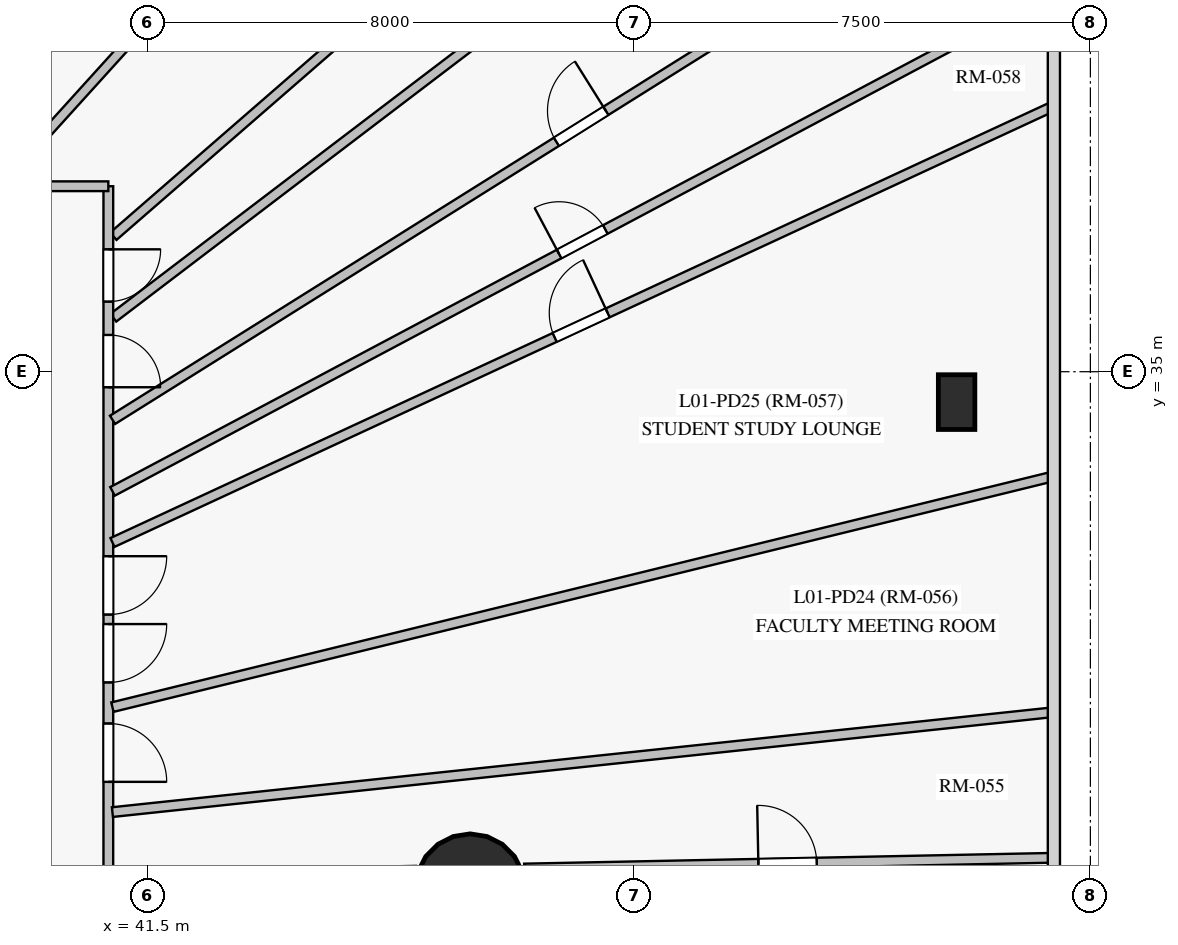
"""IFC4 building model, lengths in metres.
Left out: names, types, materials, properties, quantities, classifications, styles, units other than length and angle.
Written with IfcOpenShell. Run it as: python <this file> out.ifc"""

import sys

from ifc_helpers import new_model, si_unit, direction, frame, frame_2d, origin, origin_with_axes, origin_2d, place, context, subcontext, project, spatial, rectangle, circle, extrude, source, transform, mapped, element, fill, save


model = new_model("IFC4")
c1 = context("Model", 3, precision=1e-05, world=origin(), true_north=direction((0.0, 1.0)))
c2 = subcontext(c1, "Body", "Model", "MODEL_VIEW")
j1 = project(units=[si_unit("LENGTHUNIT", "METRE"), si_unit("PLANEANGLEUNIT", "RADIAN")], contexts=[c1])
p1 = place(None, origin())
s1 = spatial("IfcSite", under=j1, at=p1, CompositionType="ELEMENT")
p2 = place(p1, origin())
s2 = spatial("IfcBuilding", under=s1, at=p2, CompositionType="ELEMENT")
p3 = place(p2, frame((0.0, 0.0, 4.5)))
s3 = spatial("IfcBuildingStorey", under=s2, at=p3, CompositionType="ELEMENT", Elevation=4.5)
m1 = source(origin_with_axes(), c2, "Body", "SweptSolid", [
    extrude(circle(Radius=0.9, at=origin_2d()), origin(), (0.0, 0.0, 1.0), 4.5),
])
p4 = place(p3, frame((46.8, 26.5, 0.0), z_axis=(0.0, 0.0, 1.0), x_axis=(1.0, 0.0, 0.0)))
e1 = element("IfcColumn", 1, at=p4, inside=s3, PredefinedType="COLUMN", context=c2, shape_type="MappedRepresentation", body=[
    mapped(m1, transform((0.0, 0.0, 0.0), scale=1.0)),
])
m2 = source(origin_with_axes(), c2, "Body", "SweptSolid", [
    extrude(rectangle(XDim=0.6, YDim=0.9, at=origin_2d()), origin(), (0.0, 0.0, 1.0), 4.5),
])
p5 = place(p3, frame((54.8, 34.5, 0.0), z_axis=(0.0, 0.0, 1.0), x_axis=(1.0, 0.0, 0.0)))
e2 = element("IfcColumn", 2, at=p5, inside=s3, PredefinedType="PILASTER", context=c2, shape_type="MappedRepresentation", body=[
    mapped(m2, transform((0.0, 0.0, 0.0), scale=1.0)),
])
p6 = place(p3, frame((40.932, 37.227, 0.0), z_axis=(0.0, 0.0, 1.0), x_axis=(0.754711343855, 0.656057000158, 0.0)))
e3 = element("IfcWall", 3, at=p6, inside=s3, PredefinedType="PARTITIONING", context=c2, shape_type="SweptSolid", body=[
    extrude(rectangle(XDim=19.568, YDim=0.16, at=frame_2d((9.784, 0.0))), origin(), (0.0, 0.0, 1.0), 4.2),
])
p7 = place(p6, frame((9.291, 0.0, 0.0)))
e4 = element("IfcOpeningElement", 4, at=p7, cuts=e3, PredefinedType="OPENING", context=c2, shape_type="SweptSolid", body=[
    extrude(rectangle(XDim=0.96, YDim=2.15, at=frame_2d((0.48, 1.075))), frame((0.0, 0.09, 0.0), z_axis=(0.0, -1.0, 0.0), x_axis=(1.0, 0.0, 0.0)), (0.0, 0.0, 1.0), 0.18),
])
p8 = place(p3, frame((40.932, 35.888, 0.0), z_axis=(0.0, 0.0, 1.0), x_axis=(0.795705622, 0.605683550311, 0.0)))
e5 = element("IfcWall", 5, at=p8, inside=s3, PredefinedType="PARTITIONING", context=c2, shape_type="SweptSolid", body=[
    extrude(rectangle(XDim=19.392, YDim=0.16, at=frame_2d((9.696, 0.0))), origin(), (0.0, 0.0, 1.0), 4.2),
])
p9 = place(p8, frame((9.203, 0.0, 0.0)))
e6 = element("IfcOpeningElement", 6, at=p9, cuts=e5, PredefinedType="OPENING", context=c2, shape_type="SweptSolid", body=[
    extrude(rectangle(XDim=0.96, YDim=2.15, at=frame_2d((0.48, 1.075))), frame((0.0, 0.09, 0.0), z_axis=(0.0, -1.0, 0.0), x_axis=(1.0, 0.0, 0.0)), (0.0, 0.0, 1.0), 0.18),
])
p10 = place(p3, frame((40.85, 38.05, 0.0), z_axis=(0.0, 0.0, 1.0), x_axis=(0.0, -1.0, 0.0)))
e7 = element("IfcWall", 7, at=p10, inside=s3, PredefinedType="PARTITIONING", context=c2, shape_type="SweptSolid", body=[
    extrude(rectangle(XDim=18.508, YDim=0.16, at=frame_2d((9.254, 0.0))), origin(), (0.0, 0.0, 1.0), 3.25),
])
p11 = place(p10, frame((13.28, 0.0, 0.0)))
e8 = element("IfcOpeningElement", 8, at=p11, cuts=e7, PredefinedType="OPENING", context=c2, shape_type="SweptSolid", body=[
    extrude(rectangle(XDim=0.96, YDim=2.15, at=frame_2d((0.48, 1.075))), frame((0.0, 0.09, 0.0), z_axis=(0.0, -1.0, 0.0), x_axis=(1.0, 0.0, 0.0)), (0.0, 0.0, 1.0), 0.18),
])
p12 = place(p10, frame((11.636, 0.0, 0.0)))
e9 = element("IfcOpeningElement", 9, at=p12, cuts=e7, PredefinedType="OPENING", context=c2, shape_type="SweptSolid", body=[
    extrude(rectangle(XDim=0.96, YDim=2.15, at=frame_2d((0.48, 1.075))), frame((0.0, 0.09, 0.0), z_axis=(0.0, -1.0, 0.0), x_axis=(1.0, 0.0, 0.0)), (0.0, 0.0, 1.0), 0.18),
])
p13 = place(p10, frame((8.835, 0.0, 0.0)))
e10 = element("IfcOpeningElement", 10, at=p13, cuts=e7, PredefinedType="OPENING", context=c2, shape_type="SweptSolid", body=[
    extrude(rectangle(XDim=0.96, YDim=2.15, at=frame_2d((0.48, 1.075))), frame((0.0, 0.09, 0.0), z_axis=(0.0, -1.0, 0.0), x_axis=(1.0, 0.0, 0.0)), (0.0, 0.0, 1.0), 0.18),
])
p14 = place(p10, frame((6.084, 0.0, 0.0)))
e11 = element("IfcOpeningElement", 11, at=p14, cuts=e7, PredefinedType="OPENING", context=c2, shape_type="SweptSolid", body=[
    extrude(rectangle(XDim=0.96, YDim=2.15, at=frame_2d((0.48, 1.075))), frame((0.0, 0.09, 0.0), z_axis=(0.0, -1.0, 0.0), x_axis=(1.0, 0.0, 0.0)), (0.0, 0.0, 1.0), 0.18),
])
p15 = place(p10, frame((7.2, 0.0, 0.0)))
e12 = element("IfcOpeningElement", 12, at=p15, cuts=e7, PredefinedType="OPENING", context=c2, shape_type="SweptSolid", body=[
    extrude(rectangle(XDim=0.96, YDim=2.15, at=frame_2d((0.48, 1.075))), frame((0.0, 0.09, 0.0), z_axis=(0.0, -1.0, 0.0), x_axis=(1.0, 0.0, 0.0)), (0.0, 0.0, 1.0), 0.18),
])
p16 = place(p10, frame((2.446, 0.0, 0.0)))
e13 = element("IfcOpeningElement", 13, at=p16, cuts=e7, PredefinedType="OPENING", context=c2, shape_type="SweptSolid", body=[
    extrude(rectangle(XDim=0.86, YDim=2.04, at=frame_2d((0.43, 1.02))), frame((0.0, 0.09, 0.0), z_axis=(0.0, -1.0, 0.0), x_axis=(1.0, 0.0, 0.0)), (0.0, 0.0, 1.0), 0.18),
])
p17 = place(p10, frame((1.037, 0.0, 0.0)))
e14 = element("IfcOpeningElement", 14, at=p17, cuts=e7, PredefinedType="OPENING", context=c2, shape_type="SweptSolid", body=[
    extrude(rectangle(XDim=0.86, YDim=2.04, at=frame_2d((0.43, 1.02))), frame((0.0, 0.09, 0.0), z_axis=(0.0, -1.0, 0.0), x_axis=(1.0, 0.0, 0.0)), (0.0, 0.0, 1.0), 0.18),
])
p18 = place(p3, frame((40.919, 34.208, 0.0), z_axis=(0.0, 0.0, 1.0), x_axis=(0.847469594602, 0.530843937731, 0.0)))
e15 = element("IfcWall", 15, at=p18, inside=s3, PredefinedType="PARTITIONING", context=c2, shape_type="SweptSolid", body=[
    extrude(rectangle(XDim=18.226, YDim=0.16, at=frame_2d((9.113, 0.0))), origin(), (0.0, 0.0, 1.0), 4.2),
])
p19 = place(p18, frame((8.613, 0.0, 0.0)))
e16 = element("IfcOpeningElement", 16, at=p19, cuts=e15, PredefinedType="OPENING", context=c2, shape_type="SweptSolid", body=[
    extrude(rectangle(XDim=0.96, YDim=2.15, at=frame_2d((0.48, 1.075))), frame((0.0, 0.09, 0.0), z_axis=(0.0, -1.0, 0.0), x_axis=(1.0, 0.0, 0.0)), (0.0, 0.0, 1.0), 0.18),
])
p20 = place(p3, frame((40.919, 33.032, 0.0), z_axis=(0.0, 0.0, 1.0), x_axis=(0.883043074969, 0.469291942984, 0.0)))
e17 = element("IfcWall", 17, at=p20, inside=s3, PredefinedType="PARTITIONING", context=c2, shape_type="SweptSolid", body=[
    extrude(rectangle(XDim=17.495, YDim=0.16, at=frame_2d((8.748, 0.0))), origin(), (0.0, 0.0, 1.0), 4.2),
])
p21 = place(p20, frame((8.317, 0.0, 0.0)))
e18 = element("IfcOpeningElement", 18, at=p21, cuts=e17, PredefinedType="OPENING", context=c2, shape_type="SweptSolid", body=[
    extrude(rectangle(XDim=0.86, YDim=2.04, at=frame_2d((0.43, 1.02))), frame((0.0, 0.09, 0.0), z_axis=(0.0, -1.0, 0.0), x_axis=(1.0, 0.0, 0.0)), (0.0, 0.0, 1.0), 0.18),
])
p22 = place(p3, frame((40.918, 32.192, 0.0), z_axis=(0.0, 0.0, 1.0), x_axis=(0.907224152949, 0.420647520265, 0.0)))
e19 = element("IfcWall", 19, at=p22, inside=s3, PredefinedType="PARTITIONING", context=c2, shape_type="SweptSolid", body=[
    extrude(rectangle(XDim=17.031, YDim=0.16, at=frame_2d((8.515, 0.0))), origin(), (0.0, 0.0, 1.0), 4.2),
])
p23 = place(p22, frame((8.015, 0.0, 0.0)))
e20 = element("IfcOpeningElement", 20, at=p23, cuts=e19, PredefinedType="OPENING", context=c2, shape_type="SweptSolid", body=[
    extrude(rectangle(XDim=0.96, YDim=2.15, at=frame_2d((0.48, 1.075))), frame((0.0, 0.09, 0.0), z_axis=(0.0, -1.0, 0.0), x_axis=(1.0, 0.0, 0.0)), (0.0, 0.0, 1.0), 0.18),
])
p24 = place(p3, frame((40.917, 29.484, 0.0), z_axis=(0.0, 0.0, 1.0), x_axis=(0.97121044227, 0.238223166012, 0.0)))
e21 = element("IfcWall", 21, at=p24, inside=s3, PredefinedType="PARTITIONING", context=c2, shape_type="SweptSolid", body=[
    extrude(rectangle(XDim=15.914, YDim=0.16, at=frame_2d((7.957, 0.0))), origin(), (0.0, 0.0, 1.0), 3.7),
])
p25 = place(p3, frame((40.917, 27.758, 0.0), z_axis=(0.0, 0.0, 1.0), x_axis=(0.994413071603, 0.10555871838, 0.0)))
e22 = element("IfcWall", 22, at=p25, inside=s3, PredefinedType="PARTITIONING", context=c2, shape_type="SweptSolid", body=[
    extrude(rectangle(XDim=15.545, YDim=0.16, at=frame_2d((7.772, 0.0))), origin(), (0.0, 0.0, 1.0), 3.7),
])
p26 = place(p3, frame((25.4, 38.05, 0.0), z_axis=(0.0, 0.0, 1.0), x_axis=(1.0, 0.0, 0.0)))
e23 = element("IfcWall", 23, at=p26, inside=s3, PredefinedType="PARTITIONING", context=c2, shape_type="SweptSolid", body=[
    extrude(rectangle(XDim=15.45, YDim=0.16, at=frame_2d((7.725, 0.0))), origin(), (0.0, 0.0, 1.0), 4.2),
])
p27 = place(p26, frame((11.452, 0.0, 0.0)))
e24 = element("IfcOpeningElement", 24, at=p27, cuts=e23, PredefinedType="OPENING", context=c2, shape_type="SweptSolid", body=[
    extrude(rectangle(XDim=0.96, YDim=2.15, at=frame_2d((0.48, 1.075))), frame((0.0, 0.09, 0.0), z_axis=(0.0, -1.0, 0.0), x_axis=(1.0, 0.0, 0.0)), (0.0, 0.0, 1.0), 0.18),
])
p28 = place(p26, frame((7.59, 0.0, 0.0)))
e25 = element("IfcOpeningElement", 25, at=p28, cuts=e23, PredefinedType="OPENING", context=c2, shape_type="SweptSolid", body=[
    extrude(rectangle(XDim=0.96, YDim=2.15, at=frame_2d((0.48, 1.075))), frame((0.0, 0.09, 0.0), z_axis=(0.0, -1.0, 0.0), x_axis=(1.0, 0.0, 0.0)), (0.0, 0.0, 1.0), 0.18),
])
p29 = place(p26, frame((5.573, 0.0, 0.0)))
e26 = element("IfcOpeningElement", 26, at=p29, cuts=e23, PredefinedType="OPENING", context=c2, shape_type="SweptSolid", body=[
    extrude(rectangle(XDim=0.96, YDim=2.15, at=frame_2d((0.48, 1.075))), frame((0.0, 0.09, 0.0), z_axis=(0.0, -1.0, 0.0), x_axis=(1.0, 0.0, 0.0)), (0.0, 0.0, 1.0), 0.18),
])
p30 = place(p26, frame((3.528, 0.0, 0.0)))
e27 = element("IfcOpeningElement", 27, at=p30, cuts=e23, PredefinedType="OPENING", context=c2, shape_type="SweptSolid", body=[
    extrude(rectangle(XDim=0.96, YDim=2.15, at=frame_2d((0.48, 1.075))), frame((0.0, 0.09, 0.0), z_axis=(0.0, -1.0, 0.0), x_axis=(1.0, 0.0, 0.0)), (0.0, 0.0, 1.0), 0.18),
])
p31 = place(p3, frame((36.273, 38.132, 0.0), z_axis=(0.0, 0.0, 1.0), x_axis=(0.552038412562, 0.833818679963, 0.0)))
e28 = element("IfcWall", 28, at=p31, inside=s3, PredefinedType="PARTITIONING", context=c2, shape_type="SweptSolid", body=[
    extrude(rectangle(XDim=14.79, YDim=0.16, at=frame_2d((7.395, 0.0))), origin(), (0.0, 0.0, 1.0), 4.2),
])
p32 = place(p31, frame((6.903, 0.0, 0.0)))
e29 = element("IfcOpeningElement", 29, at=p32, cuts=e28, PredefinedType="OPENING", context=c2, shape_type="SweptSolid", body=[
    extrude(rectangle(XDim=0.96, YDim=2.15, at=frame_2d((0.48, 1.075))), frame((0.0, 0.09, 0.0), z_axis=(0.0, -1.0, 0.0), x_axis=(1.0, 0.0, 0.0)), (0.0, 0.0, 1.0), 0.18),
])
p33 = place(p3, frame((35.426, 38.119, 0.0), z_axis=(0.0, 0.0, 1.0), x_axis=(0.508185874547, 0.861247419103, 0.0)))
e30 = element("IfcWall", 30, at=p33, inside=s3, PredefinedType="PARTITIONING", context=c2, shape_type="SweptSolid", body=[
    extrude(rectangle(XDim=14.336, YDim=0.16, at=frame_2d((7.168, 0.0))), origin(), (0.0, 0.0, 1.0), 4.2),
])
p34 = place(p3, frame((39.114, 38.132, 0.0), z_axis=(0.0, 0.0, 1.0), x_axis=(0.671237186901, 0.741242631613, 0.0)))
e31 = element("IfcWall", 31, at=p34, inside=s3, PredefinedType="PARTITIONING", context=c2, shape_type="SweptSolid", body=[
    extrude(rectangle(XDim=10.124, YDim=0.16, at=frame_2d((5.062, 0.0))), origin(), (0.0, 0.0, 1.0), 4.2),
])
p35 = place(p34, frame((4.632, 0.0, 0.0)))
e32 = element("IfcOpeningElement", 32, at=p35, cuts=e31, PredefinedType="OPENING", context=c2, shape_type="SweptSolid", body=[
    extrude(rectangle(XDim=0.86, YDim=2.04, at=frame_2d((0.43, 1.02))), frame((0.0, 0.09, 0.0), z_axis=(0.0, -1.0, 0.0), x_axis=(1.0, 0.0, 0.0)), (0.0, 0.0, 1.0), 0.18),
])
p36 = place(p3, frame((47.69, 26.83, 0.0), z_axis=(0.0, 0.0, 1.0), x_axis=(0.999793534886, 0.02031963585, 0.0)))
e33 = element("IfcWall", 33, at=p36, inside=s3, PredefinedType="PARTITIONING", context=c2, shape_type="SweptSolid", body=[
    extrude(rectangle(XDim=8.687, YDim=0.16, at=frame_2d((4.343, 0.0))), origin(), (0.0, 0.0, 1.0), 3.7),
])
p37 = place(p36, frame((3.851, 0.0, 0.0)))
e34 = element("IfcOpeningElement", 34, at=p37, cuts=e33, PredefinedType="OPENING", context=c2, shape_type="SweptSolid", body=[
    extrude(rectangle(XDim=0.96, YDim=2.15, at=frame_2d((0.48, 1.075))), frame((0.0, 0.09, 0.0), z_axis=(0.0, -1.0, 0.0), x_axis=(1.0, 0.0, 0.0)), (0.0, 0.0, 1.0), 0.18),
])
m3 = source(origin_with_axes(), c2, "Body", "SweptSolid", [
    extrude(rectangle(XDim=0.96, YDim=2.15, at=frame_2d((0.48, 1.075))), frame((0.0, 0.025, 0.0), z_axis=(0.0, -1.0, 0.0), x_axis=(1.0, 0.0, 0.0)), (0.0, 0.0, 1.0), 0.05),
])
p38 = place(p37, origin())
e35 = element("IfcDoor", 35, at=p38, inside=s3, OperationType="SINGLE_SWING_LEFT", PredefinedType="DOOR", context=c2, shape_type="MappedRepresentation", body=[
    mapped(m3, transform((0.0, 0.0, 0.0), scale=1.0)),
])
fill(e34, e35)
p39 = place(p13, origin())
e36 = element("IfcDoor", 36, at=p39, inside=s3, OperationType="SINGLE_SWING_RIGHT", PredefinedType="DOOR", context=c2, shape_type="MappedRepresentation", body=[
    mapped(m3, transform((0.0, 0.0, 0.0), scale=1.0)),
])
fill(e10, e36)
p40 = place(p14, origin())
e37 = element("IfcDoor", 37, at=p40, inside=s3, OperationType="SINGLE_SWING_LEFT", PredefinedType="DOOR", context=c2, shape_type="MappedRepresentation", body=[
    mapped(m3, transform((0.0, 0.0, 0.0), scale=1.0)),
])
fill(e11, e37)
p41 = place(p23, origin())
e38 = element("IfcDoor", 38, at=p41, inside=s3, OperationType="SINGLE_SWING_RIGHT", PredefinedType="DOOR", context=c2, shape_type="MappedRepresentation", body=[
    mapped(m3, transform((0.0, 0.0, 0.0), scale=1.0)),
])
fill(e20, e38)
p42 = place(p15, origin())
e39 = element("IfcDoor", 39, at=p42, inside=s3, OperationType="SINGLE_SWING_LEFT", PredefinedType="DOOR", context=c2, shape_type="MappedRepresentation", body=[
    mapped(m3, transform((0.0, 0.0, 0.0), scale=1.0)),
])
fill(e12, e39)
p43 = place(p19, origin())
e40 = element("IfcDoor", 40, at=p43, inside=s3, OperationType="SINGLE_SWING_RIGHT", PredefinedType="DOOR", context=c2, shape_type="MappedRepresentation", body=[
    mapped(m3, transform((0.0, 0.0, 0.0), scale=1.0)),
])
fill(e16, e40)
m4 = source(origin_with_axes(), c2, "Body", "SweptSolid", [
    extrude(rectangle(XDim=0.86, YDim=2.04, at=frame_2d((0.43, 1.02))), frame((0.0, 0.025, 0.0), z_axis=(0.0, -1.0, 0.0), x_axis=(1.0, 0.0, 0.0)), (0.0, 0.0, 1.0), 0.05),
])
p44 = place(p21, origin())
e41 = element("IfcDoor", 41, at=p44, inside=s3, OperationType="SINGLE_SWING_LEFT", PredefinedType="DOOR", context=c2, shape_type="MappedRepresentation", body=[
    mapped(m4, transform((0.0, 0.0, 0.0), scale=1.0)),
])
fill(e18, e41)
p45 = place(p16, origin())
e42 = element("IfcDoor", 42, at=p45, inside=s3, OperationType="SINGLE_SWING_RIGHT", PredefinedType="DOOR", context=c2, shape_type="MappedRepresentation", body=[
    mapped(m4, transform((0.0, 0.0, 0.0), scale=1.0)),
])
fill(e13, e42)
p46 = place(p17, origin())
e43 = element("IfcDoor", 43, at=p46, inside=s3, OperationType="SINGLE_SWING_LEFT", PredefinedType="DOOR", context=c2, shape_type="MappedRepresentation", body=[
    mapped(m4, transform((0.0, 0.0, 0.0), scale=1.0)),
])
fill(e14, e43)
save(model, sys.argv[1])
